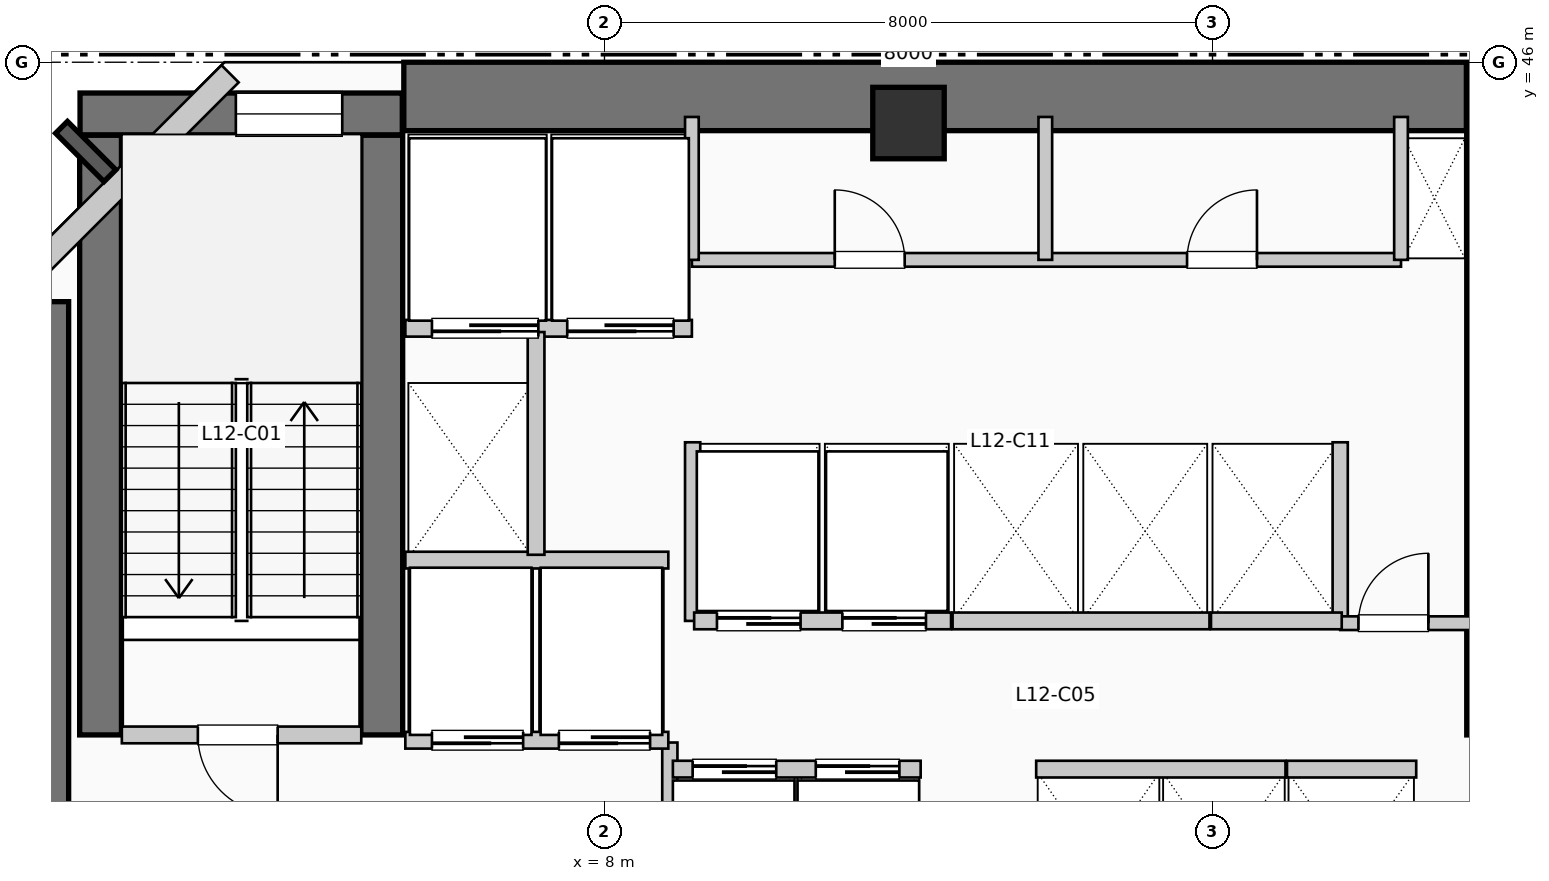
"""IFC4 building model, lengths in metres.
Left out: names, types, materials, properties, quantities, classifications, styles, units other than length and angle.
Written with IfcOpenShell. Run it as: python <this file> out.ifc"""

import sys

from ifc_helpers import new_model, si_unit, direction, frame, frame_2d, origin, origin_2d, place, context, subcontext, project, spatial, rectangle, extrude, element, fill, save


model = new_model("IFC4")
c1 = context("Model", 3, precision=1e-05, world=origin(), true_north=direction((0.0, 1.0)))
c2 = subcontext(c1, "Body", "Model", "MODEL_VIEW")
j1 = project(units=[si_unit("LENGTHUNIT", "METRE"), si_unit("PLANEANGLEUNIT", "RADIAN")], contexts=[c1])
p1 = place(None, origin())
s1 = spatial("IfcSite", under=j1, at=p1, CompositionType="ELEMENT")
p2 = place(p1, origin())
s2 = spatial("IfcBuilding", under=s1, at=p2, CompositionType="ELEMENT")
p3 = place(p2, frame((0.0, 0.0, 54.12)))
s3 = spatial("IfcBuildingStorey", under=s2, at=p3, CompositionType="ELEMENT", Elevation=54.12)
p4 = place(p3, frame((5.36, 45.55, 0.0), z_axis=(0.0, 0.0, 1.0), x_axis=(1.0, 0.0, 0.0)))
e1 = element("IfcWall", 1, at=p4, inside=s3, PredefinedType="SHEAR", context=c2, shape_type="SweptSolid", body=[
    extrude(rectangle(XDim=13.98, YDim=0.9, at=frame_2d((6.99, 0.0))), origin(), (0.0, 0.0, 1.0), 3.96),
])
p5 = place(p3, frame((0.5, 34.95, 0.0), z_axis=(0.0, 0.0, 1.0), x_axis=(0.0, 1.0, 0.0)))
e2 = element("IfcWall", 2, at=p5, inside=s3, PredefinedType="SHEAR", context=c2, shape_type="SweptSolid", body=[
    extrude(rectangle(XDim=7.9, YDim=0.9, at=frame_2d((3.95, 0.0))), origin(), (0.0, 0.0, 1.0), 3.96),
])
for number, where, z_axis, x_axis in (
    (3, (1.37, 37.15, 0.0), (0.0, 0.0, 1.0), (0.0, 1.0, 0.0)),
    (4, (5.07, 37.15, 0.0), (0.0, 0.0, 1.0), (0.0, 1.0, 0.0)),
):
    element("IfcWall", number, at=place(p3, frame(where, z_axis=z_axis, x_axis=x_axis)), inside=s3, PredefinedType="SHEAR", context=c2, shape_type="SweptSolid", body=[
        extrude(rectangle(XDim=7.89, YDim=0.55, at=frame_2d((3.945, 0.0))), origin(), (0.0, 0.0, 1.0), 3.96),
    ])
p6 = place(p3, frame((1.1, 45.32, 0.0), z_axis=(0.0, 0.0, 1.0), x_axis=(1.0, 0.0, 0.0)))
e5 = element("IfcWall", 5, at=p6, inside=s3, PredefinedType="SHEAR", context=c2, shape_type="SweptSolid", body=[
    extrude(rectangle(XDim=4.24, YDim=0.55, at=frame_2d((2.12, 0.0))), origin(), (0.0, 0.0, 1.0), 3.96),
])
p7 = place(p6, frame((2.05, 0.0, 1.05)))
e6 = element("IfcOpeningElement", 6, at=p7, cuts=e5, PredefinedType="OPENING", context=c2, shape_type="SweptSolid", body=[
    extrude(rectangle(XDim=1.4, YDim=1.8, at=frame_2d((0.7, 0.9))), frame((0.0, 0.285, 0.0), z_axis=(0.0, -1.0, 0.0), x_axis=(1.0, 0.0, 0.0)), (0.0, 0.0, 1.0), 0.57),
])
p8 = place(p3, frame((19.62, 37.15, 0.0), z_axis=(0.0, 0.0, 1.0), x_axis=(0.0, 1.0, 0.0)))
e7 = element("IfcWall", 7, at=p8, inside=s3, PredefinedType="SHEAR", context=c2, shape_type="SweptSolid", body=[
    extrude(rectangle(XDim=7.89, YDim=0.55, at=frame_2d((3.945, 0.0))), origin(), (0.0, 0.0, 1.0), 3.96),
])
p9 = place(p3, frame((19.35, 45.32, 0.0), z_axis=(0.0, 0.0, 1.0), x_axis=(1.0, 0.0, 0.0)))
e8 = element("IfcWall", 8, at=p9, inside=s3, PredefinedType="SHEAR", context=c2, shape_type="SweptSolid", body=[
    extrude(rectangle(XDim=3.69, YDim=0.55, at=frame_2d((1.845, 0.0))), origin(), (0.0, 0.0, 1.0), 3.96),
])
p10 = place(p9, frame((1.15, 0.0, 1.05)))
e9 = element("IfcOpeningElement", 9, at=p10, cuts=e8, PredefinedType="OPENING", context=c2, shape_type="SweptSolid", body=[
    extrude(rectangle(XDim=1.4, YDim=1.8, at=frame_2d((0.7, 0.9))), frame((0.0, 0.285, 0.0), z_axis=(0.0, -1.0, 0.0), x_axis=(1.0, 0.0, 0.0)), (0.0, 0.0, 1.0), 0.57),
])
p11 = place(p3, frame((12.0, 45.2, 0.0), z_axis=(0.0, 0.0, 1.0), x_axis=(1.0, 0.0, 0.0)))
e10 = element("IfcColumn", 10, at=p11, inside=s3, PredefinedType="COLUMN", context=c2, shape_type="SweptSolid", body=[
    extrude(rectangle(XDim=0.94, YDim=0.94, at=origin_2d()), origin(), (0.0, 0.0, 1.0), 3.96),
])
p12 = place(p3, frame((3.074, 45.848, 0.0), z_axis=(0.0, 0.0, 1.0), x_axis=(-0.707106781187, -0.707106781187, 0.0)))
e11 = element("IfcWall", 11, at=p12, inside=s3, PredefinedType="SOLIDWALL", context=c2, shape_type="SweptSolid", body=[
    extrude(rectangle(XDim=4.133, YDim=0.32, at=frame_2d((2.066, 0.0))), origin(), (0.0, 0.0, 1.0), 3.71),
])
p13 = place(p3, frame((1.65, 37.15, 0.0), z_axis=(0.0, 0.0, 1.0), x_axis=(1.0, 0.0, 0.0)))
e12 = element("IfcWall", 12, at=p13, inside=s3, PredefinedType="PARTITIONING", context=c2, shape_type="SweptSolid", body=[
    extrude(rectangle(XDim=3.15, YDim=0.22, at=frame_2d((1.575, 0.0))), origin(), (0.0, 0.0, 1.0), 3.71),
])
p14 = place(p13, frame((2.05, 0.0, 0.0), z_axis=(0.0, 0.0, 1.0), x_axis=(-1.0, 0.0, 0.0)))
e13 = element("IfcOpeningElement", 13, at=p14, cuts=e12, PredefinedType="OPENING", context=c2, shape_type="SweptSolid", body=[
    extrude(rectangle(XDim=1.05, YDim=2.15, at=frame_2d((0.525, 1.075))), frame((0.0, 0.12, 0.0), z_axis=(0.0, -1.0, 0.0), x_axis=(1.0, 0.0, 0.0)), (0.0, 0.0, 1.0), 0.24),
])
p15 = place(p3, frame((8.86, 34.55, 0.0), z_axis=(0.0, 0.0, 1.0), x_axis=(0.0, 1.0, 0.0)))
e14 = element("IfcWall", 14, at=p15, inside=s3, PredefinedType="PARTITIONING", context=c2, shape_type="SweptSolid", body=[
    extrude(rectangle(XDim=2.5, YDim=0.2, at=frame_2d((1.25, 0.0))), origin(), (0.0, 0.0, 1.0), 3.71),
])
p16 = place(p3, frame((5.38, 37.08, 0.0), z_axis=(0.0, 0.0, 1.0), x_axis=(1.0, 0.0, 0.0)))
e15 = element("IfcWall", 15, at=p16, inside=s3, PredefinedType="PARTITIONING", context=c2, shape_type="SweptSolid", body=[
    extrude(rectangle(XDim=3.46, YDim=0.22, at=frame_2d((1.73, 0.0))), origin(), (0.0, 0.0, 1.0), 3.71),
])
p17 = place(p16, frame((1.55, 0.0, 0.0), z_axis=(0.0, 0.0, 1.0), x_axis=(-1.0, 0.0, 0.0)))
e16 = element("IfcOpeningElement", 16, at=p17, cuts=e15, PredefinedType="OPENING", context=c2, shape_type="SweptSolid", body=[
    extrude(rectangle(XDim=1.2, YDim=2.2, at=frame_2d((0.6, 1.1))), frame((0.0, 0.12, 0.0), z_axis=(0.0, -1.0, 0.0), x_axis=(1.0, 0.0, 0.0)), (0.0, 0.0, 1.0), 0.24),
])
p18 = place(p16, frame((3.22, 0.0, 0.0), z_axis=(0.0, 0.0, 1.0), x_axis=(-1.0, 0.0, 0.0)))
e17 = element("IfcOpeningElement", 17, at=p18, cuts=e15, PredefinedType="OPENING", context=c2, shape_type="SweptSolid", body=[
    extrude(rectangle(XDim=1.2, YDim=2.2, at=frame_2d((0.6, 1.1))), frame((0.0, 0.12, 0.0), z_axis=(0.0, -1.0, 0.0), x_axis=(1.0, 0.0, 0.0)), (0.0, 0.0, 1.0), 0.24),
])
p19 = place(p3, frame((5.38, 39.45, 0.0), z_axis=(0.0, 0.0, 1.0), x_axis=(1.0, 0.0, 0.0)))
e18 = element("IfcWall", 18, at=p19, inside=s3, PredefinedType="PARTITIONING", context=c2, shape_type="SweptSolid", body=[
    extrude(rectangle(XDim=3.46, YDim=0.22, at=frame_2d((1.73, 0.0))), origin(), (0.0, 0.0, 1.0), 3.71),
])
p20 = place(p3, frame((5.38, 42.5, 0.0), z_axis=(0.0, 0.0, 1.0), x_axis=(1.0, 0.0, 0.0)))
e19 = element("IfcWall", 19, at=p20, inside=s3, PredefinedType="PARTITIONING", context=c2, shape_type="SweptSolid", body=[
    extrude(rectangle(XDim=3.77, YDim=0.22, at=frame_2d((1.885, 0.0))), origin(), (0.0, 0.0, 1.0), 3.71),
])
p21 = place(p20, frame((1.75, 0.0, 0.0), z_axis=(0.0, 0.0, 1.0), x_axis=(-1.0, 0.0, 0.0)))
e20 = element("IfcOpeningElement", 20, at=p21, cuts=e19, PredefinedType="OPENING", context=c2, shape_type="SweptSolid", body=[
    extrude(rectangle(XDim=1.4, YDim=2.2, at=frame_2d((0.7, 1.1))), frame((0.0, 0.12, 0.0), z_axis=(0.0, -1.0, 0.0), x_axis=(1.0, 0.0, 0.0)), (0.0, 0.0, 1.0), 0.24),
])
p22 = place(p20, frame((3.53, 0.0, 0.0), z_axis=(0.0, 0.0, 1.0), x_axis=(-1.0, 0.0, 0.0)))
e21 = element("IfcOpeningElement", 21, at=p22, cuts=e19, PredefinedType="OPENING", context=c2, shape_type="SweptSolid", body=[
    extrude(rectangle(XDim=1.4, YDim=2.2, at=frame_2d((0.7, 1.1))), frame((0.0, 0.12, 0.0), z_axis=(0.0, -1.0, 0.0), x_axis=(1.0, 0.0, 0.0)), (0.0, 0.0, 1.0), 0.24),
])
p23 = place(p3, frame((7.1, 39.52, 0.0), z_axis=(0.0, 0.0, 1.0), x_axis=(0.0, 1.0, 0.0)))
e22 = element("IfcWall", 22, at=p23, inside=s3, PredefinedType="PARTITIONING", context=c2, shape_type="SweptSolid", body=[
    extrude(rectangle(XDim=2.93, YDim=0.22, at=frame_2d((1.465, 0.0))), origin(), (0.0, 0.0, 1.0), 3.71),
])
for number, where, z_axis, x_axis in (
    (23, (9.16, 38.65, 0.0), (0.0, 0.0, 1.0), (0.0, 1.0, 0.0)),
    (24, (17.68, 38.65, 0.0), (0.0, 0.0, 1.0), (0.0, 1.0, 0.0)),
):
    element("IfcWall", number, at=place(p3, frame(where, z_axis=z_axis, x_axis=x_axis)), inside=s3, PredefinedType="PARTITIONING", context=c2, shape_type="SweptSolid", body=[
        extrude(rectangle(XDim=2.35, YDim=0.2, at=frame_2d((1.175, 0.0))), origin(), (0.0, 0.0, 1.0), 3.71),
    ])
p24 = place(p3, frame((17.68, 38.62, 0.0), z_axis=(0.0, 0.0, 1.0), x_axis=(1.0, 0.0, 0.0)))
e25 = element("IfcWall", 25, at=p24, inside=s3, PredefinedType="PARTITIONING", context=c2, shape_type="SweptSolid", body=[
    extrude(rectangle(XDim=1.84, YDim=0.18, at=frame_2d((0.92, 0.0))), origin(), (0.0, 0.0, 1.0), 3.71),
])
p25 = place(p24, frame((0.24, 0.0, 0.0)))
e26 = element("IfcOpeningElement", 26, at=p25, cuts=e25, PredefinedType="OPENING", context=c2, shape_type="SweptSolid", body=[
    extrude(rectangle(XDim=0.92, YDim=2.1, at=frame_2d((0.46, 1.05))), frame((0.0, 0.1, 0.0), z_axis=(0.0, -1.0, 0.0), x_axis=(1.0, 0.0, 0.0)), (0.0, 0.0, 1.0), 0.2),
])
p26 = place(p3, frame((8.9, 36.7, 0.0), z_axis=(0.0, 0.0, 1.0), x_axis=(1.0, 0.0, 0.0)))
e27 = element("IfcWall", 27, at=p26, inside=s3, PredefinedType="PARTITIONING", context=c2, shape_type="SweptSolid", body=[
    extrude(rectangle(XDim=3.26, YDim=0.22, at=frame_2d((1.63, 0.0))), origin(), (0.0, 0.0, 1.0), 3.71),
])
p27 = place(p26, frame((0.26, 0.0, 0.0)))
e28 = element("IfcOpeningElement", 28, at=p27, cuts=e27, PredefinedType="OPENING", context=c2, shape_type="SweptSolid", body=[
    extrude(rectangle(XDim=1.1, YDim=2.2, at=frame_2d((0.55, 1.1))), frame((0.0, 0.12, 0.0), z_axis=(0.0, -1.0, 0.0), x_axis=(1.0, 0.0, 0.0)), (0.0, 0.0, 1.0), 0.24),
])
p28 = place(p26, frame((1.88, 0.0, 0.0)))
e29 = element("IfcOpeningElement", 29, at=p28, cuts=e27, PredefinedType="OPENING", context=c2, shape_type="SweptSolid", body=[
    extrude(rectangle(XDim=1.1, YDim=2.2, at=frame_2d((0.55, 1.1))), frame((0.0, 0.12, 0.0), z_axis=(0.0, -1.0, 0.0), x_axis=(1.0, 0.0, 0.0)), (0.0, 0.0, 1.0), 0.24),
])
p29 = place(p3, frame((9.18, 38.65, 0.0), z_axis=(0.0, 0.0, 1.0), x_axis=(1.0, 0.0, 0.0)))
e30 = element("IfcWall", 30, at=p29, inside=s3, PredefinedType="PARTITIONING", context=c2, shape_type="SweptSolid", body=[
    extrude(rectangle(XDim=3.38, YDim=0.22, at=frame_2d((1.69, 0.0))), origin(), (0.0, 0.0, 1.0), 3.71),
])
p30 = place(p29, frame((0.3, 0.0, 0.0)))
e31 = element("IfcOpeningElement", 31, at=p30, cuts=e30, PredefinedType="OPENING", context=c2, shape_type="SweptSolid", body=[
    extrude(rectangle(XDim=1.1, YDim=2.2, at=frame_2d((0.55, 1.1))), frame((0.0, 0.12, 0.0), z_axis=(0.0, -1.0, 0.0), x_axis=(1.0, 0.0, 0.0)), (0.0, 0.0, 1.0), 0.24),
])
p31 = place(p29, frame((1.95, 0.0, 0.0)))
e32 = element("IfcOpeningElement", 32, at=p31, cuts=e30, PredefinedType="OPENING", context=c2, shape_type="SweptSolid", body=[
    extrude(rectangle(XDim=1.1, YDim=2.2, at=frame_2d((0.55, 1.1))), frame((0.0, 0.12, 0.0), z_axis=(0.0, -1.0, 0.0), x_axis=(1.0, 0.0, 0.0)), (0.0, 0.0, 1.0), 0.24),
])
p32 = place(p3, frame((13.68, 36.7, 0.0), z_axis=(0.0, 0.0, 1.0), x_axis=(1.0, 0.0, 0.0)))
e33 = element("IfcWall", 33, at=p32, inside=s3, PredefinedType="PARTITIONING", context=c2, shape_type="SweptSolid", body=[
    extrude(rectangle(XDim=3.28, YDim=0.22, at=frame_2d((1.64, 0.0))), origin(), (0.0, 0.0, 1.0), 3.71),
])
p33 = place(p3, frame((12.58, 38.65, 0.0), z_axis=(0.0, 0.0, 1.0), x_axis=(1.0, 0.0, 0.0)))
e34 = element("IfcWall", 34, at=p33, inside=s3, PredefinedType="PARTITIONING", context=c2, shape_type="SweptSolid", body=[
    extrude(rectangle(XDim=3.38, YDim=0.22, at=frame_2d((1.69, 0.0))), origin(), (0.0, 0.0, 1.0), 3.71),
])
p34 = place(p3, frame((16.98, 36.7, 0.0), z_axis=(0.0, 0.0, 1.0), x_axis=(1.0, 0.0, 0.0)))
e35 = element("IfcWall", 35, at=p34, inside=s3, PredefinedType="PARTITIONING", context=c2, shape_type="SweptSolid", body=[
    extrude(rectangle(XDim=1.7, YDim=0.22, at=frame_2d((0.85, 0.0))), origin(), (0.0, 0.0, 1.0), 3.71),
])
p35 = place(p3, frame((15.98, 38.65, 0.0), z_axis=(0.0, 0.0, 1.0), x_axis=(1.0, 0.0, 0.0)))
e36 = element("IfcWall", 36, at=p35, inside=s3, PredefinedType="PARTITIONING", context=c2, shape_type="SweptSolid", body=[
    extrude(rectangle(XDim=1.72, YDim=0.22, at=frame_2d((0.86, 0.0))), origin(), (0.0, 0.0, 1.0), 3.71),
])
p36 = place(p3, frame((9.15, 43.4, 0.0), z_axis=(0.0, 0.0, 1.0), x_axis=(1.0, 0.0, 0.0)))
e37 = element("IfcWall", 37, at=p36, inside=s3, PredefinedType="PLUMBINGWALL", context=c2, shape_type="SweptSolid", body=[
    extrude(rectangle(XDim=9.33, YDim=0.18, at=frame_2d((4.665, 0.0))), origin(), (0.0, 0.0, 1.0), 3.71),
])
p37 = place(p36, frame((1.88, 0.0, 0.0)))
e38 = element("IfcOpeningElement", 38, at=p37, cuts=e37, PredefinedType="OPENING", context=c2, shape_type="SweptSolid", body=[
    extrude(rectangle(XDim=0.92, YDim=2.1, at=frame_2d((0.46, 1.05))), frame((0.0, 0.1, 0.0), z_axis=(0.0, -1.0, 0.0), x_axis=(1.0, 0.0, 0.0)), (0.0, 0.0, 1.0), 0.2),
])
p38 = place(p36, frame((6.515, 0.0, 0.0)))
e39 = element("IfcOpeningElement", 39, at=p38, cuts=e37, PredefinedType="OPENING", context=c2, shape_type="SweptSolid", body=[
    extrude(rectangle(XDim=0.92, YDim=2.1, at=frame_2d((0.46, 1.05))), frame((0.0, 0.1, 0.0), z_axis=(0.0, -1.0, 0.0), x_axis=(1.0, 0.0, 0.0)), (0.0, 0.0, 1.0), 0.2),
])
for number, where, z_axis, x_axis in (
    (40, (9.15, 43.4, 0.0), (0.0, 0.0, 1.0), (0.0, 1.0, 0.0)),
    (41, (18.48, 43.4, 0.0), (0.0, 0.0, 1.0), (0.0, 1.0, 0.0)),
    (42, (13.8, 43.4, 0.0), (0.0, 0.0, 1.0), (0.0, 1.0, 0.0)),
):
    element("IfcWall", number, at=place(p3, frame(where, z_axis=z_axis, x_axis=x_axis)), inside=s3, PredefinedType="PLUMBINGWALL", context=c2, shape_type="SweptSolid", body=[
        extrude(rectangle(XDim=1.88, YDim=0.18, at=frame_2d((0.94, 0.0))), origin(), (0.0, 0.0, 1.0), 3.71),
    ])
p39 = place(p7, origin())
e43 = element("IfcWindow", 43, at=p39, inside=s3, PartitioningType="SINGLE_PANEL", PredefinedType="WINDOW", context=c2, shape_type="SweptSolid", body=[
    extrude(rectangle(XDim=1.4, YDim=1.8, at=frame_2d((0.7, 0.9))), frame((0.0, 0.03, 0.0), z_axis=(0.0, -1.0, 0.0), x_axis=(1.0, 0.0, 0.0)), (0.0, 0.0, 1.0), 0.06),
])
fill(e6, e43)
p40 = place(p14, origin())
e44 = element("IfcDoor", 44, at=p40, inside=s3, OperationType="SINGLE_SWING_RIGHT", PredefinedType="DOOR", context=c2, shape_type="SweptSolid", body=[
    extrude(rectangle(XDim=1.05, YDim=2.15, at=frame_2d((0.525, 1.075))), frame((0.0, 0.025, 0.0), z_axis=(0.0, -1.0, 0.0), x_axis=(1.0, 0.0, 0.0)), (0.0, 0.0, 1.0), 0.05),
])
fill(e13, e44)
p41 = place(p17, origin())
e45 = element("IfcDoor", 45, at=p41, inside=s3, OperationType="SLIDING_TO_RIGHT", PredefinedType="DOOR", context=c2, shape_type="SweptSolid", body=[
    extrude(rectangle(XDim=1.2, YDim=2.2, at=frame_2d((0.6, 1.1))), frame((0.0, 0.025, 0.0), z_axis=(0.0, -1.0, 0.0), x_axis=(1.0, 0.0, 0.0)), (0.0, 0.0, 1.0), 0.05),
])
fill(e16, e45)
p42 = place(p18, origin())
e46 = element("IfcDoor", 46, at=p42, inside=s3, OperationType="SLIDING_TO_RIGHT", PredefinedType="DOOR", context=c2, shape_type="SweptSolid", body=[
    extrude(rectangle(XDim=1.2, YDim=2.2, at=frame_2d((0.6, 1.1))), frame((0.0, 0.025, 0.0), z_axis=(0.0, -1.0, 0.0), x_axis=(1.0, 0.0, 0.0)), (0.0, 0.0, 1.0), 0.05),
])
fill(e17, e46)
p43 = place(p21, origin())
e47 = element("IfcDoor", 47, at=p43, inside=s3, OperationType="SLIDING_TO_LEFT", PredefinedType="DOOR", context=c2, shape_type="SweptSolid", body=[
    extrude(rectangle(XDim=1.4, YDim=2.2, at=frame_2d((0.7, 1.1))), frame((0.0, 0.025, 0.0), z_axis=(0.0, -1.0, 0.0), x_axis=(1.0, 0.0, 0.0)), (0.0, 0.0, 1.0), 0.05),
])
fill(e20, e47)
p44 = place(p22, origin())
e48 = element("IfcDoor", 48, at=p44, inside=s3, OperationType="SLIDING_TO_LEFT", PredefinedType="DOOR", context=c2, shape_type="SweptSolid", body=[
    extrude(rectangle(XDim=1.4, YDim=2.2, at=frame_2d((0.7, 1.1))), frame((0.0, 0.025, 0.0), z_axis=(0.0, -1.0, 0.0), x_axis=(1.0, 0.0, 0.0)), (0.0, 0.0, 1.0), 0.05),
])
fill(e21, e48)
p45 = place(p25, origin())
e49 = element("IfcDoor", 49, at=p45, inside=s3, OperationType="SINGLE_SWING_RIGHT", PredefinedType="DOOR", context=c2, shape_type="SweptSolid", body=[
    extrude(rectangle(XDim=0.92, YDim=2.1, at=frame_2d((0.46, 1.05))), frame((0.0, 0.025, 0.0), z_axis=(0.0, -1.0, 0.0), x_axis=(1.0, 0.0, 0.0)), (0.0, 0.0, 1.0), 0.05),
])
fill(e26, e49)
p46 = place(p27, origin())
e50 = element("IfcDoor", 50, at=p46, inside=s3, OperationType="SLIDING_TO_LEFT", PredefinedType="DOOR", context=c2, shape_type="SweptSolid", body=[
    extrude(rectangle(XDim=1.1, YDim=2.2, at=frame_2d((0.55, 1.1))), frame((0.0, 0.025, 0.0), z_axis=(0.0, -1.0, 0.0), x_axis=(1.0, 0.0, 0.0)), (0.0, 0.0, 1.0), 0.05),
])
fill(e28, e50)
p47 = place(p28, origin())
e51 = element("IfcDoor", 51, at=p47, inside=s3, OperationType="SLIDING_TO_LEFT", PredefinedType="DOOR", context=c2, shape_type="SweptSolid", body=[
    extrude(rectangle(XDim=1.1, YDim=2.2, at=frame_2d((0.55, 1.1))), frame((0.0, 0.025, 0.0), z_axis=(0.0, -1.0, 0.0), x_axis=(1.0, 0.0, 0.0)), (0.0, 0.0, 1.0), 0.05),
])
fill(e29, e51)
p48 = place(p30, origin())
e52 = element("IfcDoor", 52, at=p48, inside=s3, OperationType="SLIDING_TO_LEFT", PredefinedType="DOOR", context=c2, shape_type="SweptSolid", body=[
    extrude(rectangle(XDim=1.1, YDim=2.2, at=frame_2d((0.55, 1.1))), frame((0.0, 0.025, 0.0), z_axis=(0.0, -1.0, 0.0), x_axis=(1.0, 0.0, 0.0)), (0.0, 0.0, 1.0), 0.05),
])
fill(e31, e52)
p49 = place(p31, origin())
e53 = element("IfcDoor", 53, at=p49, inside=s3, OperationType="SLIDING_TO_LEFT", PredefinedType="DOOR", context=c2, shape_type="SweptSolid", body=[
    extrude(rectangle(XDim=1.1, YDim=2.2, at=frame_2d((0.55, 1.1))), frame((0.0, 0.025, 0.0), z_axis=(0.0, -1.0, 0.0), x_axis=(1.0, 0.0, 0.0)), (0.0, 0.0, 1.0), 0.05),
])
fill(e32, e53)
p50 = place(p37, origin())
e54 = element("IfcDoor", 54, at=p50, inside=s3, OperationType="SINGLE_SWING_LEFT", PredefinedType="DOOR", context=c2, shape_type="SweptSolid", body=[
    extrude(rectangle(XDim=0.92, YDim=2.1, at=frame_2d((0.46, 1.05))), frame((0.0, 0.025, 0.0), z_axis=(0.0, -1.0, 0.0), x_axis=(1.0, 0.0, 0.0)), (0.0, 0.0, 1.0), 0.05),
])
fill(e38, e54)
p51 = place(p38, origin())
e55 = element("IfcDoor", 55, at=p51, inside=s3, OperationType="SINGLE_SWING_RIGHT", PredefinedType="DOOR", context=c2, shape_type="SweptSolid", body=[
    extrude(rectangle(XDim=0.92, YDim=2.1, at=frame_2d((0.46, 1.05))), frame((0.0, 0.025, 0.0), z_axis=(0.0, -1.0, 0.0), x_axis=(1.0, 0.0, 0.0)), (0.0, 0.0, 1.0), 0.05),
])
fill(e39, e55)
save(model, sys.argv[1])
